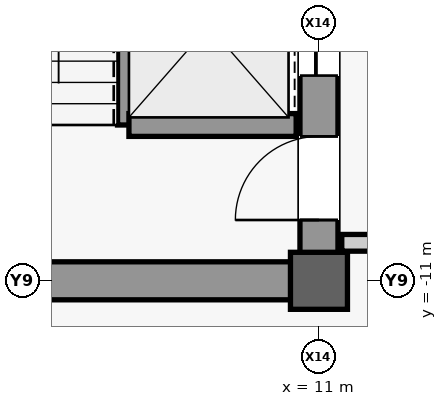
"""IFC4 building model, lengths in metres.
Left out: names, types, materials, properties, quantities, classifications, styles, units other than length and angle.
Written with IfcOpenShell. Run it as: python <this file> out.ifc"""

import sys

from ifc_helpers import new_model, si_unit, direction, frame, frame_2d, origin, origin_2d, place, context, subcontext, project, spatial, rectangle, extrude, source, transform, mapped, element, fill, save


model = new_model("IFC4")
c1 = context("Model", 3, precision=1e-05, world=origin(), true_north=direction((0.0, 1.0)))
c2 = subcontext(c1, "Body", "Model", "MODEL_VIEW")
j1 = project(units=[si_unit("LENGTHUNIT", "METRE"), si_unit("PLANEANGLEUNIT", "RADIAN")], contexts=[c1])
p1 = place(None, origin())
s1 = spatial("IfcSite", under=j1, at=p1, CompositionType="ELEMENT")
p2 = place(p1, origin())
s2 = spatial("IfcBuilding", under=s1, at=p2, CompositionType="ELEMENT")
p3 = place(p2, frame((0.0, 0.0, 394.7)))
s3 = spatial("IfcBuildingStorey", under=s2, at=p3, CompositionType="ELEMENT", Elevation=394.7)
m1 = source(origin(), c2, "Body", "SweptSolid", [
    extrude(rectangle(XDim=22.0, YDim=0.5, at=frame_2d((11.0, 0.0))), origin(), (0.0, 0.0, 1.0), 4.45),
])
p4 = place(p3, frame((11.0, -11.0, 0.0), z_axis=(0.0, 0.0, 1.0), x_axis=(0.0, 1.0, 0.0)))
e1 = element("IfcWall", 1, at=p4, inside=s3, PredefinedType="SHEAR", context=c2, shape_type="MappedRepresentation", body=[
    mapped(m1, transform((0.0, 0.0, 0.0), scale=1.0)),
])
m2 = source(origin(), c2, "Body", "SweptSolid", [
    extrude(rectangle(XDim=1.1, YDim=2.2, at=frame_2d((0.55, 1.1))), frame((0.0, 0.26, 0.0), z_axis=(0.0, -1.0, 0.0), x_axis=(1.0, 0.0, 0.0)), (0.0, 0.0, 1.0), 0.52),
])
p5 = place(p4, frame((0.8, 0.0, 0.0)))
e2 = element("IfcOpeningElement", 2, at=p5, cuts=e1, PredefinedType="OPENING", context=c2, shape_type="MappedRepresentation", body=[
    mapped(m2, transform((0.0, 0.0, 0.0), scale=1.0)),
])
m3 = source(origin(), c2, "Body", "SweptSolid", [
    extrude(rectangle(XDim=0.9, YDim=2.15, at=frame_2d((0.45, 1.075))), frame((0.0, 0.26, 0.0), z_axis=(0.0, -1.0, 0.0), x_axis=(1.0, 0.0, 0.0)), (0.0, 0.0, 1.0), 0.52),
])
p6 = place(p4, frame((7.575, 0.0, 0.0)))
e3 = element("IfcOpeningElement", 3, at=p6, cuts=e1, PredefinedType="OPENING", context=c2, shape_type="MappedRepresentation", body=[
    mapped(m3, transform((0.0, 0.0, 0.0), scale=1.0)),
])
m4 = source(origin(), c2, "Body", "SweptSolid", [
    extrude(rectangle(XDim=1.3, YDim=2.3, at=frame_2d((0.65, 1.15))), frame((0.0, 0.26, 0.0), z_axis=(0.0, -1.0, 0.0), x_axis=(1.0, 0.0, 0.0)), (0.0, 0.0, 1.0), 0.52),
])
p7 = place(p4, frame((2.7, 0.0, 0.0)))
e4 = element("IfcOpeningElement", 4, at=p7, cuts=e1, PredefinedType="OPENING", context=c2, shape_type="MappedRepresentation", body=[
    mapped(m4, transform((0.0, 0.0, 0.0), scale=1.0)),
])
p8 = place(p4, frame((13.35, 0.0, 0.0)))
e5 = element("IfcOpeningElement", 5, at=p8, cuts=e1, PredefinedType="OPENING", context=c2, shape_type="MappedRepresentation", body=[
    mapped(m4, transform((0.0, 0.0, 0.0), scale=1.0)),
])
m5 = source(origin(), c2, "Body", "SweptSolid", [
    extrude(rectangle(XDim=5.9, YDim=0.5, at=frame_2d((2.95, 0.0))), origin(), (0.0, 0.0, 1.0), 4.45),
])
p9 = place(p3, frame((4.85, -11.0, 0.0), z_axis=(0.0, 0.0, 1.0), x_axis=(1.0, 0.0, 0.0)))
e6 = element("IfcWall", 6, at=p9, inside=s3, PredefinedType="SHEAR", context=c2, shape_type="MappedRepresentation", body=[
    mapped(m5, transform((0.0, 0.0, 0.0), scale=1.0)),
])
m6 = source(origin(), c2, "Body", "SweptSolid", [
    extrude(rectangle(XDim=0.75, YDim=0.75, at=origin_2d()), origin(), (0.0, 0.0, 1.0), 4.8),
])
p10 = place(p3, frame((11.0, -11.0, 0.0), z_axis=(0.0, 0.0, 1.0), x_axis=(1.0, 0.0, 0.0)))
e7 = element("IfcColumn", 7, at=p10, inside=s3, PredefinedType="COLUMN", context=c2, shape_type="MappedRepresentation", body=[
    mapped(m6, transform((0.0, 0.0, 0.0), scale=1.0)),
])
m7 = source(origin(), c2, "Body", "SweptSolid", [
    extrude(rectangle(XDim=7.8, YDim=0.3, at=frame_2d((3.9, 0.0))), origin(), (0.0, 0.0, 1.0), 4.45),
])
p11 = place(p3, frame((8.5, -8.95, 0.0), z_axis=(0.0, 0.0, 1.0), x_axis=(0.0, 1.0, 0.0)))
e8 = element("IfcWall", 8, at=p11, inside=s3, PredefinedType="SHEAR", context=c2, shape_type="MappedRepresentation", body=[
    mapped(m7, transform((0.0, 0.0, 0.0), scale=1.0)),
])
m8 = source(origin(), c2, "Body", "SweptSolid", [
    extrude(rectangle(XDim=2.2, YDim=0.3, at=frame_2d((1.1, 0.0))), origin(), (0.0, 0.0, 1.0), 4.45),
])
p12 = place(p3, frame((8.5, -8.95, 0.0), z_axis=(0.0, 0.0, 1.0), x_axis=(1.0, 0.0, 0.0)))
e9 = element("IfcWall", 9, at=p12, inside=s3, PredefinedType="SHEAR", context=c2, shape_type="MappedRepresentation", body=[
    mapped(m8, transform((0.0, 0.0, 0.0), scale=1.0)),
])
m9 = source(origin(), c2, "Body", "SweptSolid", [
    extrude(rectangle(XDim=4.05, YDim=0.22, at=frame_2d((2.025, 0.0))), origin(), (0.0, 0.0, 1.0), 4.45),
])
p13 = place(p3, frame((11.3, -10.5, 0.0), z_axis=(0.0, 0.0, 1.0), x_axis=(1.0, 0.0, 0.0)))
e10 = element("IfcWall", 10, at=p13, inside=s3, PredefinedType="PARTITIONING", context=c2, shape_type="MappedRepresentation", body=[
    mapped(m9, transform((0.0, 0.0, 0.0), scale=1.0)),
])
m10 = source(origin(), c2, "Body", "SweptSolid", [
    extrude(rectangle(XDim=1.1, YDim=2.2, at=frame_2d((0.55, 1.1))), frame((0.0, 0.025, 0.0), z_axis=(0.0, -1.0, 0.0), x_axis=(1.0, 0.0, 0.0)), (0.0, 0.0, 1.0), 0.05),
])
p14 = place(p5, origin())
e11 = element("IfcDoor", 11, at=p14, inside=s3, OperationType="SINGLE_SWING_LEFT", PredefinedType="DOOR", context=c2, shape_type="MappedRepresentation", body=[
    mapped(m10, transform((0.0, 0.0, 0.0), scale=1.0)),
])
fill(e2, e11)
m11 = source(origin(), c2, "Body", "SweptSolid", [
    extrude(rectangle(XDim=1.3, YDim=2.3, at=frame_2d((0.65, 1.15))), frame((0.0, 0.025, 0.0), z_axis=(0.0, -1.0, 0.0), x_axis=(1.0, 0.0, 0.0)), (0.0, 0.0, 1.0), 0.05),
])
p15 = place(p7, origin())
e12 = element("IfcDoor", 12, at=p15, inside=s3, OperationType="SLIDING_TO_LEFT", PredefinedType="DOOR", context=c2, shape_type="MappedRepresentation", body=[
    mapped(m11, transform((0.0, 0.0, 0.0), scale=1.0)),
])
fill(e4, e12)
save(model, sys.argv[1])
